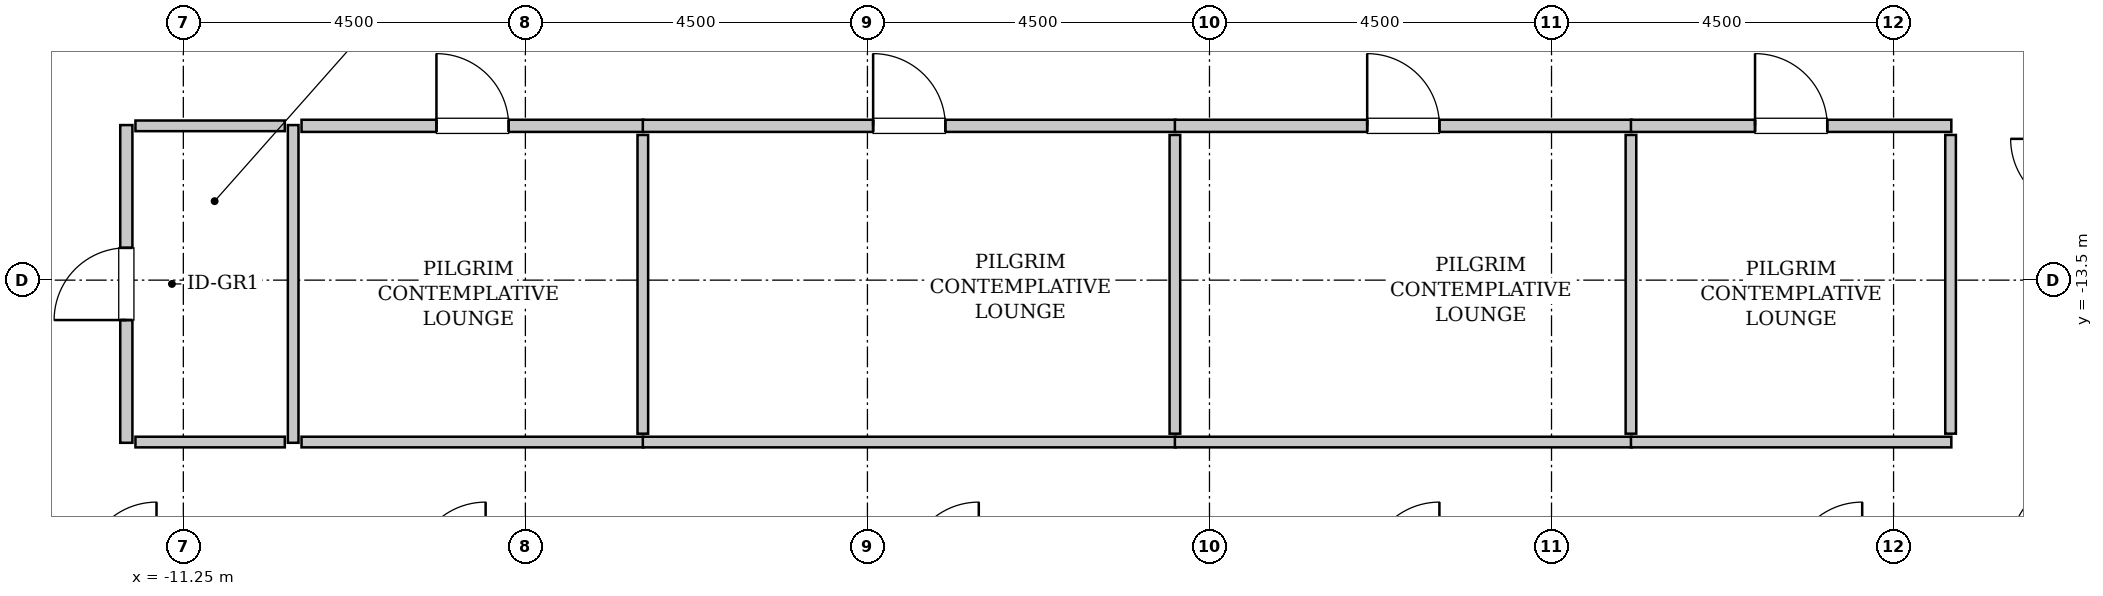
"""IFC4 building model, lengths in metres.
Left out: names, types, materials, properties, quantities, classifications, styles, units other than length and angle.
Written with IfcOpenShell. Run it as: python <this file> out.ifc"""

import sys

from ifc_helpers import new_model, si_unit, direction, frame, frame_2d, origin, place, context, subcontext, project, spatial, rectangle, extrude, source, transform, mapped, element, fill, save


model = new_model("IFC4")
c1 = context("Model", 3, precision=1e-05, world=origin(), true_north=direction((0.0, 1.0)))
c2 = subcontext(c1, "Body", "Model", "MODEL_VIEW")
j1 = project(units=[si_unit("LENGTHUNIT", "METRE"), si_unit("PLANEANGLEUNIT", "RADIAN")], contexts=[c1])
p1 = place(None, origin())
s1 = spatial("IfcSite", under=j1, at=p1, CompositionType="ELEMENT")
p2 = place(p1, origin())
s2 = spatial("IfcBuilding", under=s1, at=p2, CompositionType="ELEMENT")
p3 = place(p2, frame((0.0, 0.0, 179.2)))
s3 = spatial("IfcBuildingStorey", under=s2, at=p3, CompositionType="ELEMENT", Elevation=179.2)
m1 = source(origin(), c2, "Body", "SweptSolid", [
    extrude(rectangle(XDim=4.18, YDim=0.16, at=frame_2d((2.09, 0.0))), origin(), (0.0, 0.0, 1.0), 3.535),
])
p4 = place(p3, frame((-12.0, -15.64, 0.0), z_axis=(0.0, 0.0, 1.0), x_axis=(0.0, 1.0, 0.0)))
e1 = element("IfcWall", 1, at=p4, inside=s3, PredefinedType="PARTITIONING", context=c2, shape_type="MappedRepresentation", body=[
    mapped(m1, transform((0.0, 0.0, 0.0), x_axis=(1.0, 0.0, 0.0), y_axis=(0.0, 1.0, 0.0), z_axis=(0.0, 0.0, 1.0), scale=1.0)),
])
p5 = place(p4, frame((1.615, 0.0, 0.0)))
e2 = element("IfcOpeningElement", 2, at=p5, cuts=e1, PredefinedType="OPENING", context=c2, shape_type="SweptSolid", body=[
    extrude(rectangle(XDim=0.95, YDim=2.1, at=frame_2d((0.475, 1.05))), frame((0.0, 0.09, 0.0), z_axis=(0.0, -1.0, 0.0), x_axis=(1.0, 0.0, 0.0)), (0.0, 0.0, 1.0), 0.18),
])
m2 = source(origin(), c2, "Body", "SweptSolid", [
    extrude(rectangle(XDim=4.18, YDim=0.14, at=frame_2d((2.09, 0.0))), origin(), (0.0, 0.0, 1.0), 3.535),
])
p6 = place(p3, frame((-9.805, -15.64, 0.0), z_axis=(0.0, 0.0, 1.0), x_axis=(0.0, 1.0, 0.0)))
e3 = element("IfcWall", 3, at=p6, inside=s3, PredefinedType="PARTITIONING", context=c2, shape_type="MappedRepresentation", body=[
    mapped(m2, transform((0.0, 0.0, 0.0), x_axis=(1.0, 0.0, 0.0), y_axis=(0.0, 1.0, 0.0), z_axis=(0.0, 0.0, 1.0), scale=1.0)),
])
m3 = source(origin(), c2, "Body", "SweptSolid", [
    extrude(rectangle(XDim=1.965, YDim=0.14, at=frame_2d((0.982, 0.0))), origin(), (0.0, 0.0, 1.0), 3.535),
])
for number, where, z_axis, x_axis in (
    (4, (-11.88, -11.47, 0.0), (0.0, 0.0, 1.0), (1.0, 0.0, 0.0)),
    (5, (-11.88, -15.63, 0.0), (0.0, 0.0, 1.0), (1.0, 0.0, 0.0)),
):
    element("IfcWall", number, at=place(p3, frame(where, z_axis=z_axis, x_axis=x_axis)), inside=s3, PredefinedType="PARTITIONING", context=c2, shape_type="MappedRepresentation", body=[
        mapped(m3, transform((0.0, 0.0, 0.0), x_axis=(1.0, 0.0, 0.0), y_axis=(0.0, 1.0, 0.0), z_axis=(0.0, 0.0, 1.0), scale=1.0)),
    ])
m4 = source(origin(), c2, "Body", "SweptSolid", [
    extrude(rectangle(XDim=4.5, YDim=0.16, at=frame_2d((2.25, 0.0))), origin(), (0.0, 0.0, 1.0), 3.535),
])
p7 = place(p3, frame((-9.695, -11.47, 0.0), z_axis=(0.0, 0.0, 1.0), x_axis=(1.0, 0.0, 0.0)))
e6 = element("IfcWall", 6, at=p7, inside=s3, PredefinedType="PARTITIONING", context=c2, shape_type="MappedRepresentation", body=[
    mapped(m4, transform((0.0, 0.0, 0.0), x_axis=(1.0, 0.0, 0.0), y_axis=(0.0, 1.0, 0.0), z_axis=(0.0, 0.0, 1.0), scale=1.0)),
])
p8 = place(p7, frame((1.775, 0.0, 0.0)))
e7 = element("IfcOpeningElement", 7, at=p8, cuts=e6, PredefinedType="OPENING", context=c2, shape_type="SweptSolid", body=[
    extrude(rectangle(XDim=0.95, YDim=2.1, at=frame_2d((0.475, 1.05))), frame((0.0, 0.09, 0.0), z_axis=(0.0, -1.0, 0.0), x_axis=(1.0, 0.0, 0.0)), (0.0, 0.0, 1.0), 0.18),
])
m5 = source(origin(), c2, "Body", "SweptSolid", [
    extrude(rectangle(XDim=4.5, YDim=0.14, at=frame_2d((2.25, 0.0))), origin(), (0.0, 0.0, 1.0), 3.535),
])
p9 = place(p3, frame((-9.695, -15.63, 0.0), z_axis=(0.0, 0.0, 1.0), x_axis=(1.0, 0.0, 0.0)))
e8 = element("IfcWall", 8, at=p9, inside=s3, PredefinedType="PARTITIONING", context=c2, shape_type="MappedRepresentation", body=[
    mapped(m5, transform((0.0, 0.0, 0.0), x_axis=(1.0, 0.0, 0.0), y_axis=(0.0, 1.0, 0.0), z_axis=(0.0, 0.0, 1.0), scale=1.0)),
])
m6 = source(origin(), c2, "Body", "SweptSolid", [
    extrude(rectangle(XDim=3.93, YDim=0.14, at=frame_2d((1.965, 0.0))), origin(), (0.0, 0.0, 1.0), 3.535),
])
p10 = place(p3, frame((-5.205, -15.52, 0.0), z_axis=(0.0, 0.0, 1.0), x_axis=(0.0, 1.0, 0.0)))
e9 = element("IfcWall", 9, at=p10, inside=s3, PredefinedType="PARTITIONING", context=c2, shape_type="MappedRepresentation", body=[
    mapped(m6, transform((0.0, 0.0, 0.0), x_axis=(1.0, 0.0, 0.0), y_axis=(0.0, 1.0, 0.0), z_axis=(0.0, 0.0, 1.0), scale=1.0)),
])
m7 = source(origin(), c2, "Body", "SweptSolid", [
    extrude(rectangle(XDim=7.01, YDim=0.16, at=frame_2d((3.505, 0.0))), origin(), (0.0, 0.0, 1.0), 3.535),
])
p11 = place(p3, frame((-5.205, -11.47, 0.0), z_axis=(0.0, 0.0, 1.0), x_axis=(1.0, 0.0, 0.0)))
e10 = element("IfcWall", 10, at=p11, inside=s3, PredefinedType="PARTITIONING", context=c2, shape_type="MappedRepresentation", body=[
    mapped(m7, transform((0.0, 0.0, 0.0), x_axis=(1.0, 0.0, 0.0), y_axis=(0.0, 1.0, 0.0), z_axis=(0.0, 0.0, 1.0), scale=1.0)),
])
p12 = place(p11, frame((3.03, 0.0, 0.0)))
e11 = element("IfcOpeningElement", 11, at=p12, cuts=e10, PredefinedType="OPENING", context=c2, shape_type="SweptSolid", body=[
    extrude(rectangle(XDim=0.95, YDim=2.1, at=frame_2d((0.475, 1.05))), frame((0.0, 0.09, 0.0), z_axis=(0.0, -1.0, 0.0), x_axis=(1.0, 0.0, 0.0)), (0.0, 0.0, 1.0), 0.18),
])
m8 = source(origin(), c2, "Body", "SweptSolid", [
    extrude(rectangle(XDim=7.01, YDim=0.14, at=frame_2d((3.505, 0.0))), origin(), (0.0, 0.0, 1.0), 3.535),
])
p13 = place(p3, frame((-5.205, -15.63, 0.0), z_axis=(0.0, 0.0, 1.0), x_axis=(1.0, 0.0, 0.0)))
e12 = element("IfcWall", 12, at=p13, inside=s3, PredefinedType="PARTITIONING", context=c2, shape_type="MappedRepresentation", body=[
    mapped(m8, transform((0.0, 0.0, 0.0), x_axis=(1.0, 0.0, 0.0), y_axis=(0.0, 1.0, 0.0), z_axis=(0.0, 0.0, 1.0), scale=1.0)),
])
p14 = place(p3, frame((1.795, -15.52, 0.0), z_axis=(0.0, 0.0, 1.0), x_axis=(0.0, 1.0, 0.0)))
e13 = element("IfcWall", 13, at=p14, inside=s3, PredefinedType="PARTITIONING", context=c2, shape_type="MappedRepresentation", body=[
    mapped(m6, transform((0.0, 0.0, 0.0), x_axis=(1.0, 0.0, 0.0), y_axis=(0.0, 1.0, 0.0), z_axis=(0.0, 0.0, 1.0), scale=1.0)),
])
m9 = source(origin(), c2, "Body", "SweptSolid", [
    extrude(rectangle(XDim=6.01, YDim=0.16, at=frame_2d((3.005, 0.0))), origin(), (0.0, 0.0, 1.0), 3.535),
])
p15 = place(p3, frame((1.795, -11.47, 0.0), z_axis=(0.0, 0.0, 1.0), x_axis=(1.0, 0.0, 0.0)))
e14 = element("IfcWall", 14, at=p15, inside=s3, PredefinedType="PARTITIONING", context=c2, shape_type="MappedRepresentation", body=[
    mapped(m9, transform((0.0, 0.0, 0.0), x_axis=(1.0, 0.0, 0.0), y_axis=(0.0, 1.0, 0.0), z_axis=(0.0, 0.0, 1.0), scale=1.0)),
])
p16 = place(p15, frame((2.53, 0.0, 0.0)))
e15 = element("IfcOpeningElement", 15, at=p16, cuts=e14, PredefinedType="OPENING", context=c2, shape_type="SweptSolid", body=[
    extrude(rectangle(XDim=0.95, YDim=2.1, at=frame_2d((0.475, 1.05))), frame((0.0, 0.09, 0.0), z_axis=(0.0, -1.0, 0.0), x_axis=(1.0, 0.0, 0.0)), (0.0, 0.0, 1.0), 0.18),
])
m10 = source(origin(), c2, "Body", "SweptSolid", [
    extrude(rectangle(XDim=6.01, YDim=0.14, at=frame_2d((3.005, 0.0))), origin(), (0.0, 0.0, 1.0), 3.535),
])
p17 = place(p3, frame((1.795, -15.63, 0.0), z_axis=(0.0, 0.0, 1.0), x_axis=(1.0, 0.0, 0.0)))
e16 = element("IfcWall", 16, at=p17, inside=s3, PredefinedType="PARTITIONING", context=c2, shape_type="MappedRepresentation", body=[
    mapped(m10, transform((0.0, 0.0, 0.0), x_axis=(1.0, 0.0, 0.0), y_axis=(0.0, 1.0, 0.0), z_axis=(0.0, 0.0, 1.0), scale=1.0)),
])
p18 = place(p3, frame((7.795, -15.52, 0.0), z_axis=(0.0, 0.0, 1.0), x_axis=(0.0, 1.0, 0.0)))
e17 = element("IfcWall", 17, at=p18, inside=s3, PredefinedType="PARTITIONING", context=c2, shape_type="MappedRepresentation", body=[
    mapped(m6, transform((0.0, 0.0, 0.0), x_axis=(1.0, 0.0, 0.0), y_axis=(0.0, 1.0, 0.0), z_axis=(0.0, 0.0, 1.0), scale=1.0)),
])
m11 = source(origin(), c2, "Body", "SweptSolid", [
    extrude(rectangle(XDim=4.215, YDim=0.16, at=frame_2d((2.107, 0.0))), origin(), (0.0, 0.0, 1.0), 3.535),
])
p19 = place(p3, frame((7.795, -11.47, 0.0), z_axis=(0.0, 0.0, 1.0), x_axis=(1.0, 0.0, 0.0)))
e18 = element("IfcWall", 18, at=p19, inside=s3, PredefinedType="PARTITIONING", context=c2, shape_type="MappedRepresentation", body=[
    mapped(m11, transform((0.0, 0.0, 0.0), x_axis=(1.0, 0.0, 0.0), y_axis=(0.0, 1.0, 0.0), z_axis=(0.0, 0.0, 1.0), scale=1.0)),
])
p20 = place(p19, frame((1.633, 0.0, 0.0)))
e19 = element("IfcOpeningElement", 19, at=p20, cuts=e18, PredefinedType="OPENING", context=c2, shape_type="SweptSolid", body=[
    extrude(rectangle(XDim=0.95, YDim=2.1, at=frame_2d((0.475, 1.05))), frame((0.0, 0.09, 0.0), z_axis=(0.0, -1.0, 0.0), x_axis=(1.0, 0.0, 0.0)), (0.0, 0.0, 1.0), 0.18),
])
m12 = source(origin(), c2, "Body", "SweptSolid", [
    extrude(rectangle(XDim=4.215, YDim=0.14, at=frame_2d((2.107, 0.0))), origin(), (0.0, 0.0, 1.0), 3.535),
])
p21 = place(p3, frame((7.795, -15.63, 0.0), z_axis=(0.0, 0.0, 1.0), x_axis=(1.0, 0.0, 0.0)))
e20 = element("IfcWall", 20, at=p21, inside=s3, PredefinedType="PARTITIONING", context=c2, shape_type="MappedRepresentation", body=[
    mapped(m12, transform((0.0, 0.0, 0.0), x_axis=(1.0, 0.0, 0.0), y_axis=(0.0, 1.0, 0.0), z_axis=(0.0, 0.0, 1.0), scale=1.0)),
])
p22 = place(p3, frame((12.0, -15.52, 0.0), z_axis=(0.0, 0.0, 1.0), x_axis=(0.0, 1.0, 0.0)))
e21 = element("IfcWall", 21, at=p22, inside=s3, PredefinedType="PARTITIONING", context=c2, shape_type="MappedRepresentation", body=[
    mapped(m6, transform((0.0, 0.0, 0.0), x_axis=(1.0, 0.0, 0.0), y_axis=(0.0, 1.0, 0.0), z_axis=(0.0, 0.0, 1.0), scale=1.0)),
])
m13 = source(origin(), c2, "Body", "SweptSolid", [
    extrude(rectangle(XDim=0.95, YDim=2.1, at=frame_2d((0.475, 1.05))), frame((0.0, 0.025, 0.0), z_axis=(0.0, -1.0, 0.0), x_axis=(1.0, 0.0, 0.0)), (0.0, 0.0, 1.0), 0.05),
])
p23 = place(p5, origin())
e22 = element("IfcDoor", 22, at=p23, inside=s3, OperationType="SINGLE_SWING_LEFT", PredefinedType="DOOR", context=c2, shape_type="MappedRepresentation", body=[
    mapped(m13, transform((0.0, 0.0, 0.0), x_axis=(1.0, 0.0, 0.0), y_axis=(0.0, 1.0, 0.0), z_axis=(0.0, 0.0, 1.0), scale=1.0)),
])
fill(e2, e22)
p24 = place(p8, origin())
e23 = element("IfcDoor", 23, at=p24, inside=s3, OperationType="SINGLE_SWING_LEFT", PredefinedType="DOOR", context=c2, shape_type="MappedRepresentation", body=[
    mapped(m13, transform((0.0, 0.0, 0.0), x_axis=(1.0, 0.0, 0.0), y_axis=(0.0, 1.0, 0.0), z_axis=(0.0, 0.0, 1.0), scale=1.0)),
])
fill(e7, e23)
p25 = place(p12, origin())
e24 = element("IfcDoor", 24, at=p25, inside=s3, OperationType="SINGLE_SWING_LEFT", PredefinedType="DOOR", context=c2, shape_type="MappedRepresentation", body=[
    mapped(m13, transform((0.0, 0.0, 0.0), x_axis=(1.0, 0.0, 0.0), y_axis=(0.0, 1.0, 0.0), z_axis=(0.0, 0.0, 1.0), scale=1.0)),
])
fill(e11, e24)
p26 = place(p16, origin())
e25 = element("IfcDoor", 25, at=p26, inside=s3, OperationType="SINGLE_SWING_LEFT", PredefinedType="DOOR", context=c2, shape_type="MappedRepresentation", body=[
    mapped(m13, transform((0.0, 0.0, 0.0), x_axis=(1.0, 0.0, 0.0), y_axis=(0.0, 1.0, 0.0), z_axis=(0.0, 0.0, 1.0), scale=1.0)),
])
fill(e15, e25)
p27 = place(p20, origin())
e26 = element("IfcDoor", 26, at=p27, inside=s3, OperationType="SINGLE_SWING_LEFT", PredefinedType="DOOR", context=c2, shape_type="MappedRepresentation", body=[
    mapped(m13, transform((0.0, 0.0, 0.0), x_axis=(1.0, 0.0, 0.0), y_axis=(0.0, 1.0, 0.0), z_axis=(0.0, 0.0, 1.0), scale=1.0)),
])
fill(e19, e26)
save(model, sys.argv[1])
